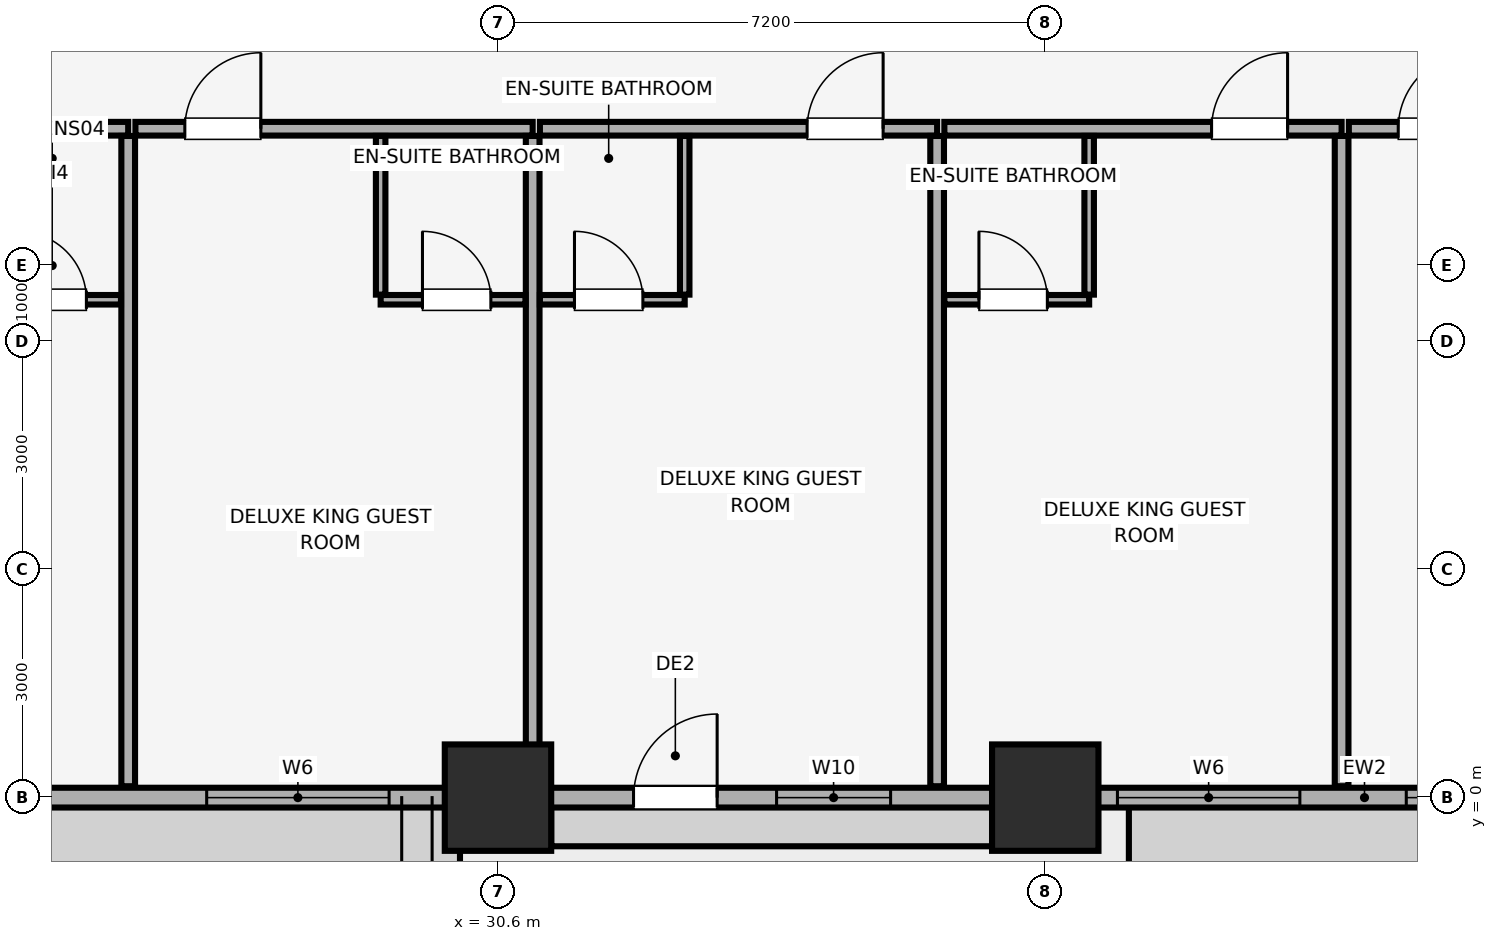
"""IFC4 building model, lengths in metres.
Left out: names, types, materials, properties, quantities, classifications, styles, units other than length and angle.
Written with IfcOpenShell. Run it as: python <this file> out.ifc"""

import sys

from ifc_helpers import new_model, si_unit, direction, frame, frame_2d, origin, origin_2d, place, context, subcontext, project, spatial, rectangle, extrude, element, fill, save


model = new_model("IFC4")
c1 = context("Model", 3, precision=1e-05, world=origin(), true_north=direction((0.0, 1.0)))
c2 = subcontext(c1, "Body", "Model", "MODEL_VIEW")
j1 = project(units=[si_unit("LENGTHUNIT", "METRE"), si_unit("PLANEANGLEUNIT", "RADIAN")], contexts=[c1])
p1 = place(None, origin())
s1 = spatial("IfcSite", under=j1, at=p1, CompositionType="ELEMENT")
p2 = place(p1, origin())
s2 = spatial("IfcBuilding", under=s1, at=p2, CompositionType="ELEMENT")
p3 = place(p2, frame((0.0, 0.0, 35.15)))
s3 = spatial("IfcBuildingStorey", under=s2, at=p3, CompositionType="ELEMENT", Elevation=35.15)
for number, where, z_axis, x_axis in (
    (1, (30.6, 0.0, 0.0), (0.0, 0.0, 1.0), (1.0, 0.0, 0.0)),
    (2, (37.8, 0.0, 0.0), (0.0, 0.0, 1.0), (1.0, 0.0, 0.0)),
):
    element("IfcColumn", number, at=place(p3, frame(where, z_axis=z_axis, x_axis=x_axis)), inside=s3, PredefinedType="COLUMN", context=c2, shape_type="SweptSolid", body=[
        extrude(rectangle(XDim=1.4, YDim=1.4, at=origin_2d()), origin(), (0.0, 0.0, 1.0), 3.51),
    ])
p4 = place(p3, frame((4.2, 0.0, 0.0), z_axis=(0.0, 0.0, 1.0), x_axis=(1.0, 0.0, 0.0)))
e3 = element("IfcWall", 3, at=p4, inside=s3, PredefinedType="SOLIDWALL", context=c2, shape_type="SweptSolid", body=[
    extrude(rectangle(XDim=75.6, YDim=0.26, at=frame_2d((37.8, 0.0))), origin(), (0.0, 0.0, 1.0), 2.56),
])
p5 = place(p4, frame((13.517, 0.0, 0.0)))
e4 = element("IfcOpeningElement", 4, at=p5, cuts=e3, PredefinedType="OPENING", context=c2, shape_type="SweptSolid", body=[
    extrude(rectangle(XDim=1.1, YDim=2.15, at=frame_2d((0.55, 1.075))), frame((0.0, 0.14, 0.0), z_axis=(0.0, -1.0, 0.0), x_axis=(1.0, 0.0, 0.0)), (0.0, 0.0, 1.0), 0.28),
])
p6 = place(p4, frame((28.183, 0.0, 0.0)))
e5 = element("IfcOpeningElement", 5, at=p6, cuts=e3, PredefinedType="OPENING", context=c2, shape_type="SweptSolid", body=[
    extrude(rectangle(XDim=1.1, YDim=2.15, at=frame_2d((0.55, 1.075))), frame((0.0, 0.14, 0.0), z_axis=(0.0, -1.0, 0.0), x_axis=(1.0, 0.0, 0.0)), (0.0, 0.0, 1.0), 0.28),
])
p7 = place(p4, frame((60.983, 0.0, 0.0)))
e6 = element("IfcOpeningElement", 6, at=p7, cuts=e3, PredefinedType="OPENING", context=c2, shape_type="SweptSolid", body=[
    extrude(rectangle(XDim=1.1, YDim=2.15, at=frame_2d((0.55, 1.075))), frame((0.0, 0.14, 0.0), z_axis=(0.0, -1.0, 0.0), x_axis=(1.0, 0.0, 0.0)), (0.0, 0.0, 1.0), 0.28),
])
p8 = place(p4, frame((1.035, 0.0, 0.85)))
e7 = element("IfcOpeningElement", 7, at=p8, cuts=e3, PredefinedType="OPENING", context=c2, shape_type="SweptSolid", body=[
    extrude(rectangle(XDim=2.4, YDim=1.5, at=frame_2d((1.2, 0.75))), frame((0.0, 0.14, 0.0), z_axis=(0.0, -1.0, 0.0), x_axis=(1.0, 0.0, 0.0)), (0.0, 0.0, 1.0), 0.28),
])
p9 = place(p4, frame((7.031, 0.0, 0.85)))
e8 = element("IfcOpeningElement", 8, at=p9, cuts=e3, PredefinedType="OPENING", context=c2, shape_type="SweptSolid", body=[
    extrude(rectangle(XDim=2.4, YDim=1.5, at=frame_2d((1.2, 0.75))), frame((0.0, 0.14, 0.0), z_axis=(0.0, -1.0, 0.0), x_axis=(1.0, 0.0, 0.0)), (0.0, 0.0, 1.0), 0.28),
])
p10 = place(p4, frame((16.757, 0.0, 0.85)))
e9 = element("IfcOpeningElement", 9, at=p10, cuts=e3, PredefinedType="OPENING", context=c2, shape_type="SweptSolid", body=[
    extrude(rectangle(XDim=1.5, YDim=1.4, at=frame_2d((0.75, 0.7))), frame((0.0, 0.14, 0.0), z_axis=(0.0, -1.0, 0.0), x_axis=(1.0, 0.0, 0.0)), (0.0, 0.0, 1.0), 0.28),
])
p11 = place(p4, frame((22.567, 0.0, 0.85)))
e10 = element("IfcOpeningElement", 10, at=p11, cuts=e3, PredefinedType="OPENING", context=c2, shape_type="SweptSolid", body=[
    extrude(rectangle(XDim=2.4, YDim=1.5, at=frame_2d((1.2, 0.75))), frame((0.0, 0.14, 0.0), z_axis=(0.0, -1.0, 0.0), x_axis=(1.0, 0.0, 0.0)), (0.0, 0.0, 1.0), 0.28),
])
p12 = place(p4, frame((30.065, 0.0, 0.85)))
e11 = element("IfcOpeningElement", 11, at=p12, cuts=e3, PredefinedType="OPENING", context=c2, shape_type="SweptSolid", body=[
    extrude(rectangle(XDim=1.5, YDim=1.4, at=frame_2d((0.75, 0.7))), frame((0.0, 0.14, 0.0), z_axis=(0.0, -1.0, 0.0), x_axis=(1.0, 0.0, 0.0)), (0.0, 0.0, 1.0), 0.28),
])
p13 = place(p4, frame((34.55, 0.0, 0.85)))
e12 = element("IfcOpeningElement", 12, at=p13, cuts=e3, PredefinedType="OPENING", context=c2, shape_type="SweptSolid", body=[
    extrude(rectangle(XDim=2.4, YDim=1.5, at=frame_2d((1.2, 0.75))), frame((0.0, 0.14, 0.0), z_axis=(0.0, -1.0, 0.0), x_axis=(1.0, 0.0, 0.0)), (0.0, 0.0, 1.0), 0.28),
])
p14 = place(p4, frame((38.35, 0.0, 0.85)))
e13 = element("IfcOpeningElement", 13, at=p14, cuts=e3, PredefinedType="OPENING", context=c2, shape_type="SweptSolid", body=[
    extrude(rectangle(XDim=2.4, YDim=1.5, at=frame_2d((1.2, 0.75))), frame((0.0, 0.14, 0.0), z_axis=(0.0, -1.0, 0.0), x_axis=(1.0, 0.0, 0.0)), (0.0, 0.0, 1.0), 0.28),
])
p15 = place(p4, frame((44.281, 0.0, 0.85)))
e14 = element("IfcOpeningElement", 14, at=p15, cuts=e3, PredefinedType="OPENING", context=c2, shape_type="SweptSolid", body=[
    extrude(rectangle(XDim=2.4, YDim=1.5, at=frame_2d((1.2, 0.75))), frame((0.0, 0.14, 0.0), z_axis=(0.0, -1.0, 0.0), x_axis=(1.0, 0.0, 0.0)), (0.0, 0.0, 1.0), 0.28),
])
p16 = place(p4, frame((50.332, 0.0, 0.85)))
e15 = element("IfcOpeningElement", 15, at=p16, cuts=e3, PredefinedType="OPENING", context=c2, shape_type="SweptSolid", body=[
    extrude(rectangle(XDim=2.4, YDim=1.5, at=frame_2d((1.2, 0.75))), frame((0.0, 0.14, 0.0), z_axis=(0.0, -1.0, 0.0), x_axis=(1.0, 0.0, 0.0)), (0.0, 0.0, 1.0), 0.28),
])
p17 = place(p4, frame((53.981, 0.0, 0.85)))
e16 = element("IfcOpeningElement", 16, at=p17, cuts=e3, PredefinedType="OPENING", context=c2, shape_type="SweptSolid", body=[
    extrude(rectangle(XDim=1.5, YDim=1.4, at=frame_2d((0.75, 0.7))), frame((0.0, 0.14, 0.0), z_axis=(0.0, -1.0, 0.0), x_axis=(1.0, 0.0, 0.0)), (0.0, 0.0, 1.0), 0.28),
])
p18 = place(p4, frame((64.759, 0.0, 0.85)))
e17 = element("IfcOpeningElement", 17, at=p18, cuts=e3, PredefinedType="OPENING", context=c2, shape_type="SweptSolid", body=[
    extrude(rectangle(XDim=1.5, YDim=1.4, at=frame_2d((0.75, 0.7))), frame((0.0, 0.14, 0.0), z_axis=(0.0, -1.0, 0.0), x_axis=(1.0, 0.0, 0.0)), (0.0, 0.0, 1.0), 0.28),
])
p19 = place(p4, frame((67.509, 0.0, 0.85)))
e18 = element("IfcOpeningElement", 18, at=p19, cuts=e3, PredefinedType="OPENING", context=c2, shape_type="SweptSolid", body=[
    extrude(rectangle(XDim=2.4, YDim=1.5, at=frame_2d((1.2, 0.75))), frame((0.0, 0.14, 0.0), z_axis=(0.0, -1.0, 0.0), x_axis=(1.0, 0.0, 0.0)), (0.0, 0.0, 1.0), 0.28),
])
p20 = place(p4, frame((72.165, 0.0, 0.85)))
e19 = element("IfcOpeningElement", 19, at=p20, cuts=e3, PredefinedType="OPENING", context=c2, shape_type="SweptSolid", body=[
    extrude(rectangle(XDim=2.4, YDim=1.5, at=frame_2d((1.2, 0.75))), frame((0.0, 0.14, 0.0), z_axis=(0.0, -1.0, 0.0), x_axis=(1.0, 0.0, 0.0)), (0.0, 0.0, 1.0), 0.28),
])
p21 = place(p3, frame((20.509, 8.8, 0.0), z_axis=(0.0, 0.0, 1.0), x_axis=(1.0, 0.0, 0.0)))
e20 = element("IfcWall", 20, at=p21, inside=s3, PredefinedType="PARTITIONING", context=c2, shape_type="SweptSolid", body=[
    extrude(rectangle(XDim=5.226, YDim=0.18, at=frame_2d((2.613, 0.0))), origin(), (0.0, 0.0, 1.0), 3.51),
])
p22 = place(p21, frame((0.65, 0.0, 0.0)))
e21 = element("IfcOpeningElement", 21, at=p22, cuts=e20, PredefinedType="OPENING", context=c2, shape_type="SweptSolid", body=[
    extrude(rectangle(XDim=1.0, YDim=2.15, at=frame_2d((0.5, 1.075))), frame((0.0, 0.1, 0.0), z_axis=(0.0, -1.0, 0.0), x_axis=(1.0, 0.0, 0.0)), (0.0, 0.0, 1.0), 0.2),
])
p23 = place(p3, frame((25.735, 0.15, 0.0), z_axis=(0.0, 0.0, 1.0), x_axis=(0.0, 1.0, 0.0)))
e22 = element("IfcWall", 22, at=p23, inside=s3, PredefinedType="PARTITIONING", context=c2, shape_type="SweptSolid", body=[
    extrude(rectangle(XDim=8.555, YDim=0.18, at=frame_2d((4.278, 0.0))), origin(), (0.0, 0.0, 1.0), 3.51),
])
p24 = place(p3, frame((23.735, 6.55, 0.0), z_axis=(0.0, 0.0, 1.0), x_axis=(1.0, 0.0, 0.0)))
e23 = element("IfcWall", 23, at=p24, inside=s3, PredefinedType="PARTITIONING", context=c2, shape_type="SweptSolid", body=[
    extrude(rectangle(XDim=1.905, YDim=0.125, at=frame_2d((0.952, 0.0))), origin(), (0.0, 0.0, 1.0), 3.51),
])
p25 = place(p24, frame((0.55, 0.0, 0.0)))
e24 = element("IfcOpeningElement", 24, at=p25, cuts=e23, PredefinedType="OPENING", context=c2, shape_type="SweptSolid", body=[
    extrude(rectangle(XDim=0.9, YDim=2.1, at=frame_2d((0.45, 1.05))), frame((0.0, 0.073, 0.0), z_axis=(0.0, -1.0, 0.0), x_axis=(1.0, 0.0, 0.0)), (0.0, 0.0, 1.0), 0.145),
])
p26 = place(p3, frame((25.83, 8.8, 0.0), z_axis=(0.0, 0.0, 1.0), x_axis=(1.0, 0.0, 0.0)))
e25 = element("IfcWall", 25, at=p26, inside=s3, PredefinedType="PARTITIONING", context=c2, shape_type="SweptSolid", body=[
    extrude(rectangle(XDim=5.226, YDim=0.18, at=frame_2d((2.613, 0.0))), origin(), (0.0, 0.0, 1.0), 3.51),
])
p27 = place(p26, frame((0.65, 0.0, 0.0)))
e26 = element("IfcOpeningElement", 26, at=p27, cuts=e25, PredefinedType="OPENING", context=c2, shape_type="SweptSolid", body=[
    extrude(rectangle(XDim=1.0, YDim=2.15, at=frame_2d((0.5, 1.075))), frame((0.0, 0.1, 0.0), z_axis=(0.0, -1.0, 0.0), x_axis=(1.0, 0.0, 0.0)), (0.0, 0.0, 1.0), 0.2),
])
p28 = place(p3, frame((31.056, 0.15, 0.0), z_axis=(0.0, 0.0, 1.0), x_axis=(0.0, 1.0, 0.0)))
e27 = element("IfcWall", 27, at=p28, inside=s3, PredefinedType="PARTITIONING", context=c2, shape_type="SweptSolid", body=[
    extrude(rectangle(XDim=8.555, YDim=0.18, at=frame_2d((4.278, 0.0))), origin(), (0.0, 0.0, 1.0), 3.51),
])
p29 = place(p3, frame((29.056, 6.55, 0.0), z_axis=(0.0, 0.0, 1.0), x_axis=(1.0, 0.0, 0.0)))
e28 = element("IfcWall", 28, at=p29, inside=s3, PredefinedType="PARTITIONING", context=c2, shape_type="SweptSolid", body=[
    extrude(rectangle(XDim=1.905, YDim=0.125, at=frame_2d((0.952, 0.0))), origin(), (0.0, 0.0, 1.0), 3.51),
])
p30 = place(p29, frame((0.55, 0.0, 0.0)))
e29 = element("IfcOpeningElement", 29, at=p30, cuts=e28, PredefinedType="OPENING", context=c2, shape_type="SweptSolid", body=[
    extrude(rectangle(XDim=0.9, YDim=2.1, at=frame_2d((0.45, 1.05))), frame((0.0, 0.073, 0.0), z_axis=(0.0, -1.0, 0.0), x_axis=(1.0, 0.0, 0.0)), (0.0, 0.0, 1.0), 0.145),
])
p31 = place(p3, frame((29.056, 6.617, 0.0), z_axis=(0.0, 0.0, 1.0), x_axis=(0.0, 1.0, 0.0)))
e30 = element("IfcWall", 30, at=p31, inside=s3, PredefinedType="PARTITIONING", context=c2, shape_type="SweptSolid", body=[
    extrude(rectangle(XDim=2.088, YDim=0.125, at=frame_2d((1.044, 0.0))), origin(), (0.0, 0.0, 1.0), 3.51),
])
p32 = place(p3, frame((31.151, 8.8, 0.0), z_axis=(0.0, 0.0, 1.0), x_axis=(1.0, 0.0, 0.0)))
e31 = element("IfcWall", 31, at=p32, inside=s3, PredefinedType="PARTITIONING", context=c2, shape_type="SweptSolid", body=[
    extrude(rectangle(XDim=5.226, YDim=0.18, at=frame_2d((2.613, 0.0))), origin(), (0.0, 0.0, 1.0), 3.51),
])
p33 = place(p32, frame((3.516, 0.0, 0.0)))
e32 = element("IfcOpeningElement", 32, at=p33, cuts=e31, PredefinedType="OPENING", context=c2, shape_type="SweptSolid", body=[
    extrude(rectangle(XDim=1.0, YDim=2.15, at=frame_2d((0.5, 1.075))), frame((0.0, 0.1, 0.0), z_axis=(0.0, -1.0, 0.0), x_axis=(1.0, 0.0, 0.0)), (0.0, 0.0, 1.0), 0.2),
])
p34 = place(p3, frame((36.377, 0.15, 0.0), z_axis=(0.0, 0.0, 1.0), x_axis=(0.0, 1.0, 0.0)))
e33 = element("IfcWall", 33, at=p34, inside=s3, PredefinedType="PARTITIONING", context=c2, shape_type="SweptSolid", body=[
    extrude(rectangle(XDim=8.555, YDim=0.18, at=frame_2d((4.278, 0.0))), origin(), (0.0, 0.0, 1.0), 3.51),
])
p35 = place(p3, frame((31.151, 6.55, 0.0), z_axis=(0.0, 0.0, 1.0), x_axis=(1.0, 0.0, 0.0)))
e34 = element("IfcWall", 34, at=p35, inside=s3, PredefinedType="PARTITIONING", context=c2, shape_type="SweptSolid", body=[
    extrude(rectangle(XDim=1.905, YDim=0.125, at=frame_2d((0.953, 0.0))), origin(), (0.0, 0.0, 1.0), 3.51),
])
p36 = place(p35, frame((0.455, 0.0, 0.0)))
e35 = element("IfcOpeningElement", 35, at=p36, cuts=e34, PredefinedType="OPENING", context=c2, shape_type="SweptSolid", body=[
    extrude(rectangle(XDim=0.9, YDim=2.1, at=frame_2d((0.45, 1.05))), frame((0.0, 0.073, 0.0), z_axis=(0.0, -1.0, 0.0), x_axis=(1.0, 0.0, 0.0)), (0.0, 0.0, 1.0), 0.145),
])
p37 = place(p3, frame((33.056, 6.617, 0.0), z_axis=(0.0, 0.0, 1.0), x_axis=(0.0, 1.0, 0.0)))
e36 = element("IfcWall", 36, at=p37, inside=s3, PredefinedType="PARTITIONING", context=c2, shape_type="SweptSolid", body=[
    extrude(rectangle(XDim=2.088, YDim=0.125, at=frame_2d((1.044, 0.0))), origin(), (0.0, 0.0, 1.0), 3.51),
])
p38 = place(p3, frame((36.472, 8.8, 0.0), z_axis=(0.0, 0.0, 1.0), x_axis=(1.0, 0.0, 0.0)))
e37 = element("IfcWall", 37, at=p38, inside=s3, PredefinedType="PARTITIONING", context=c2, shape_type="SweptSolid", body=[
    extrude(rectangle(XDim=5.226, YDim=0.18, at=frame_2d((2.613, 0.0))), origin(), (0.0, 0.0, 1.0), 3.51),
])
p39 = place(p38, frame((3.516, 0.0, 0.0)))
e38 = element("IfcOpeningElement", 38, at=p39, cuts=e37, PredefinedType="OPENING", context=c2, shape_type="SweptSolid", body=[
    extrude(rectangle(XDim=1.0, YDim=2.15, at=frame_2d((0.5, 1.075))), frame((0.0, 0.1, 0.0), z_axis=(0.0, -1.0, 0.0), x_axis=(1.0, 0.0, 0.0)), (0.0, 0.0, 1.0), 0.2),
])
p40 = place(p3, frame((41.699, 0.15, 0.0), z_axis=(0.0, 0.0, 1.0), x_axis=(0.0, 1.0, 0.0)))
e39 = element("IfcWall", 39, at=p40, inside=s3, PredefinedType="PARTITIONING", context=c2, shape_type="SweptSolid", body=[
    extrude(rectangle(XDim=8.555, YDim=0.18, at=frame_2d((4.278, 0.0))), origin(), (0.0, 0.0, 1.0), 3.51),
])
p41 = place(p3, frame((36.472, 6.55, 0.0), z_axis=(0.0, 0.0, 1.0), x_axis=(1.0, 0.0, 0.0)))
e40 = element("IfcWall", 40, at=p41, inside=s3, PredefinedType="PARTITIONING", context=c2, shape_type="SweptSolid", body=[
    extrude(rectangle(XDim=1.905, YDim=0.125, at=frame_2d((0.953, 0.0))), origin(), (0.0, 0.0, 1.0), 3.51),
])
p42 = place(p41, frame((0.455, 0.0, 0.0)))
e41 = element("IfcOpeningElement", 41, at=p42, cuts=e40, PredefinedType="OPENING", context=c2, shape_type="SweptSolid", body=[
    extrude(rectangle(XDim=0.9, YDim=2.1, at=frame_2d((0.45, 1.05))), frame((0.0, 0.073, 0.0), z_axis=(0.0, -1.0, 0.0), x_axis=(1.0, 0.0, 0.0)), (0.0, 0.0, 1.0), 0.145),
])
p43 = place(p3, frame((38.377, 6.617, 0.0), z_axis=(0.0, 0.0, 1.0), x_axis=(0.0, 1.0, 0.0)))
e42 = element("IfcWall", 42, at=p43, inside=s3, PredefinedType="PARTITIONING", context=c2, shape_type="SweptSolid", body=[
    extrude(rectangle(XDim=2.088, YDim=0.125, at=frame_2d((1.044, 0.0))), origin(), (0.0, 0.0, 1.0), 3.51),
])
p44 = place(p3, frame((41.794, 8.8, 0.0), z_axis=(0.0, 0.0, 1.0), x_axis=(1.0, 0.0, 0.0)))
e43 = element("IfcWall", 43, at=p44, inside=s3, PredefinedType="PARTITIONING", context=c2, shape_type="SweptSolid", body=[
    extrude(rectangle(XDim=5.226, YDim=0.18, at=frame_2d((2.613, 0.0))), origin(), (0.0, 0.0, 1.0), 3.51),
])
p45 = place(p44, frame((0.65, 0.0, 0.0)))
e44 = element("IfcOpeningElement", 44, at=p45, cuts=e43, PredefinedType="OPENING", context=c2, shape_type="SweptSolid", body=[
    extrude(rectangle(XDim=1.0, YDim=2.15, at=frame_2d((0.5, 1.075))), frame((0.0, 0.1, 0.0), z_axis=(0.0, -1.0, 0.0), x_axis=(1.0, 0.0, 0.0)), (0.0, 0.0, 1.0), 0.2),
])
p46 = place(p6, origin())
e45 = element("IfcDoor", 45, at=p46, inside=s3, OperationType="SINGLE_SWING_RIGHT", PredefinedType="DOOR", context=c2, shape_type="SweptSolid", body=[
    extrude(rectangle(XDim=1.1, YDim=2.15, at=frame_2d((0.55, 1.075))), frame((0.0, 0.025, 0.0), z_axis=(0.0, -1.0, 0.0), x_axis=(1.0, 0.0, 0.0)), (0.0, 0.0, 1.0), 0.05),
])
fill(e5, e45)
p47 = place(p11, origin())
e46 = element("IfcWindow", 46, at=p47, inside=s3, PartitioningType="SINGLE_PANEL", PredefinedType="WINDOW", context=c2, shape_type="SweptSolid", body=[
    extrude(rectangle(XDim=2.4, YDim=1.5, at=frame_2d((1.2, 0.75))), frame((0.0, 0.03, 0.0), z_axis=(0.0, -1.0, 0.0), x_axis=(1.0, 0.0, 0.0)), (0.0, 0.0, 1.0), 0.06),
])
fill(e10, e46)
p48 = place(p12, origin())
e47 = element("IfcWindow", 47, at=p48, inside=s3, PartitioningType="SINGLE_PANEL", PredefinedType="WINDOW", context=c2, shape_type="SweptSolid", body=[
    extrude(rectangle(XDim=1.5, YDim=1.4, at=frame_2d((0.75, 0.7))), frame((0.0, 0.03, 0.0), z_axis=(0.0, -1.0, 0.0), x_axis=(1.0, 0.0, 0.0)), (0.0, 0.0, 1.0), 0.06),
])
fill(e11, e47)
p49 = place(p13, origin())
e48 = element("IfcWindow", 48, at=p49, inside=s3, PartitioningType="SINGLE_PANEL", PredefinedType="WINDOW", context=c2, shape_type="SweptSolid", body=[
    extrude(rectangle(XDim=2.4, YDim=1.5, at=frame_2d((1.2, 0.75))), frame((0.0, 0.03, 0.0), z_axis=(0.0, -1.0, 0.0), x_axis=(1.0, 0.0, 0.0)), (0.0, 0.0, 1.0), 0.06),
])
fill(e12, e48)
p50 = place(p14, origin())
e49 = element("IfcWindow", 49, at=p50, inside=s3, PartitioningType="SINGLE_PANEL", PredefinedType="WINDOW", context=c2, shape_type="SweptSolid", body=[
    extrude(rectangle(XDim=2.4, YDim=1.5, at=frame_2d((1.2, 0.75))), frame((0.0, 0.03, 0.0), z_axis=(0.0, -1.0, 0.0), x_axis=(1.0, 0.0, 0.0)), (0.0, 0.0, 1.0), 0.06),
])
fill(e13, e49)
p51 = place(p25, origin())
e50 = element("IfcDoor", 50, at=p51, inside=s3, OperationType="SINGLE_SWING_LEFT", PredefinedType="DOOR", context=c2, shape_type="SweptSolid", body=[
    extrude(rectangle(XDim=0.9, YDim=2.1, at=frame_2d((0.45, 1.05))), frame((0.0, 0.025, 0.0), z_axis=(0.0, -1.0, 0.0), x_axis=(1.0, 0.0, 0.0)), (0.0, 0.0, 1.0), 0.05),
])
fill(e24, e50)
p52 = place(p27, origin())
e51 = element("IfcDoor", 51, at=p52, inside=s3, OperationType="SINGLE_SWING_RIGHT", PredefinedType="DOOR", context=c2, shape_type="SweptSolid", body=[
    extrude(rectangle(XDim=1.0, YDim=2.15, at=frame_2d((0.5, 1.075))), frame((0.0, 0.025, 0.0), z_axis=(0.0, -1.0, 0.0), x_axis=(1.0, 0.0, 0.0)), (0.0, 0.0, 1.0), 0.05),
])
fill(e26, e51)
p53 = place(p30, origin())
e52 = element("IfcDoor", 52, at=p53, inside=s3, OperationType="SINGLE_SWING_LEFT", PredefinedType="DOOR", context=c2, shape_type="SweptSolid", body=[
    extrude(rectangle(XDim=0.9, YDim=2.1, at=frame_2d((0.45, 1.05))), frame((0.0, 0.025, 0.0), z_axis=(0.0, -1.0, 0.0), x_axis=(1.0, 0.0, 0.0)), (0.0, 0.0, 1.0), 0.05),
])
fill(e29, e52)
p54 = place(p33, origin())
e53 = element("IfcDoor", 53, at=p54, inside=s3, OperationType="SINGLE_SWING_RIGHT", PredefinedType="DOOR", context=c2, shape_type="SweptSolid", body=[
    extrude(rectangle(XDim=1.0, YDim=2.15, at=frame_2d((0.5, 1.075))), frame((0.0, 0.025, 0.0), z_axis=(0.0, -1.0, 0.0), x_axis=(1.0, 0.0, 0.0)), (0.0, 0.0, 1.0), 0.05),
])
fill(e32, e53)
p55 = place(p36, origin())
e54 = element("IfcDoor", 54, at=p55, inside=s3, OperationType="SINGLE_SWING_LEFT", PredefinedType="DOOR", context=c2, shape_type="SweptSolid", body=[
    extrude(rectangle(XDim=0.9, YDim=2.1, at=frame_2d((0.45, 1.05))), frame((0.0, 0.025, 0.0), z_axis=(0.0, -1.0, 0.0), x_axis=(1.0, 0.0, 0.0)), (0.0, 0.0, 1.0), 0.05),
])
fill(e35, e54)
p56 = place(p39, origin())
e55 = element("IfcDoor", 55, at=p56, inside=s3, OperationType="SINGLE_SWING_RIGHT", PredefinedType="DOOR", context=c2, shape_type="SweptSolid", body=[
    extrude(rectangle(XDim=1.0, YDim=2.15, at=frame_2d((0.5, 1.075))), frame((0.0, 0.025, 0.0), z_axis=(0.0, -1.0, 0.0), x_axis=(1.0, 0.0, 0.0)), (0.0, 0.0, 1.0), 0.05),
])
fill(e38, e55)
p57 = place(p42, origin())
e56 = element("IfcDoor", 56, at=p57, inside=s3, OperationType="SINGLE_SWING_LEFT", PredefinedType="DOOR", context=c2, shape_type="SweptSolid", body=[
    extrude(rectangle(XDim=0.9, YDim=2.1, at=frame_2d((0.45, 1.05))), frame((0.0, 0.025, 0.0), z_axis=(0.0, -1.0, 0.0), x_axis=(1.0, 0.0, 0.0)), (0.0, 0.0, 1.0), 0.05),
])
fill(e41, e56)
p58 = place(p45, origin())
e57 = element("IfcDoor", 57, at=p58, inside=s3, OperationType="SINGLE_SWING_RIGHT", PredefinedType="DOOR", context=c2, shape_type="SweptSolid", body=[
    extrude(rectangle(XDim=1.0, YDim=2.15, at=frame_2d((0.5, 1.075))), frame((0.0, 0.025, 0.0), z_axis=(0.0, -1.0, 0.0), x_axis=(1.0, 0.0, 0.0)), (0.0, 0.0, 1.0), 0.05),
])
fill(e44, e57)
save(model, sys.argv[1])
